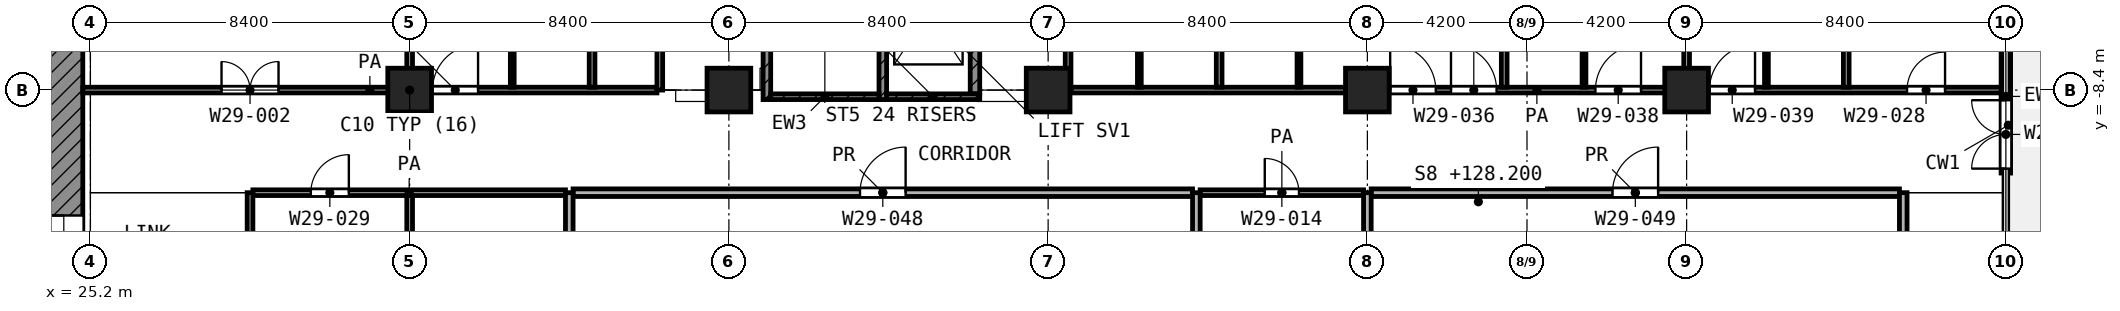
"""IFC4 building model, lengths in metres.
Left out: names, types, materials, properties, quantities, classifications, styles, units other than length and angle.
Written with IfcOpenShell. Run it as: python <this file> out.ifc"""

import sys

from ifc_helpers import new_model, si_unit, direction, frame, frame_2d, origin, origin_2d, place, context, subcontext, project, spatial, rectangle, extrude, element, fill, save


model = new_model("IFC4")
c1 = context("Model", 3, precision=1e-05, world=origin(), true_north=direction((0.0, 1.0)))
c2 = subcontext(c1, "Body", "Model", "MODEL_VIEW")
j1 = project(units=[si_unit("LENGTHUNIT", "METRE"), si_unit("PLANEANGLEUNIT", "RADIAN")], contexts=[c1])
p1 = place(None, origin())
s1 = spatial("IfcSite", under=j1, at=p1, CompositionType="ELEMENT")
p2 = place(p1, origin())
s2 = spatial("IfcBuilding", under=s1, at=p2, CompositionType="ELEMENT")
p3 = place(p2, frame((0.0, 0.0, 128.2)))
s3 = spatial("IfcBuildingStorey", under=s2, at=p3, CompositionType="ELEMENT", Elevation=128.2)
for number, where, z_axis, x_axis in (
    (1, (33.6, -8.4, 0.0), (0.0, 0.0, 1.0), (1.0, 0.0, 0.0)),
    (2, (42.0, -8.4, 0.0), (0.0, 0.0, 1.0), (1.0, 0.0, 0.0)),
    (3, (50.4, -8.4, 0.0), (0.0, 0.0, 1.0), (1.0, 0.0, 0.0)),
    (4, (58.8, -8.4, 0.0), (0.0, 0.0, 1.0), (1.0, 0.0, 0.0)),
    (5, (67.2, -8.4, 0.0), (0.0, 0.0, 1.0), (1.0, 0.0, 0.0)),
):
    element("IfcColumn", number, at=place(p3, frame(where, z_axis=z_axis, x_axis=x_axis)), inside=s3, PredefinedType="COLUMN", context=c2, shape_type="SweptSolid", body=[
        extrude(rectangle(XDim=1.15, YDim=1.15, at=origin_2d()), origin(), (0.0, 0.0, 1.0), 4.2),
    ])
p4 = place(p3, frame((75.6, -10.583, 0.0), z_axis=(0.0, 0.0, 1.0), x_axis=(0.0, 1.0, 0.0)))
e6 = element("IfcWall", 6, at=p4, inside=s3, PredefinedType="SOLIDWALL", context=c2, shape_type="SweptSolid", body=[
    extrude(rectangle(XDim=4.033, YDim=0.25, at=frame_2d((2.017, 0.0))), origin(), (0.0, 0.0, 1.0), 3.48),
])
p5 = place(p4, frame((0.117, 0.0, 0.0)))
e7 = element("IfcOpeningElement", 7, at=p5, cuts=e6, PredefinedType="OPENING", context=c2, shape_type="SweptSolid", body=[
    extrude(rectangle(XDim=1.8, YDim=2.1, at=frame_2d((0.9, 1.05))), frame((0.0, 0.135, 0.0), z_axis=(0.0, -1.0, 0.0), x_axis=(1.0, 0.0, 0.0)), (0.0, 0.0, 1.0), 0.27),
])
p6 = place(p3, frame((24.5, -24.0, 0.0), z_axis=(0.0, 0.0, 1.0), x_axis=(0.0, 1.0, 0.0)))
e8 = element("IfcWall", 8, at=p6, inside=s3, PredefinedType="SHEAR", context=c2, shape_type="SweptSolid", body=[
    extrude(rectangle(XDim=18.6, YDim=1.0, at=frame_2d((9.3, 0.0))), origin(), (0.0, 0.0, 1.0), 3.6),
])
p7 = place(p6, frame((10.5, 0.0, 0.0)))
e9 = element("IfcOpeningElement", 9, at=p7, cuts=e8, PredefinedType="OPENING", context=c2, shape_type="SweptSolid", body=[
    extrude(rectangle(XDim=1.8, YDim=2.1, at=frame_2d((0.9, 1.05))), frame((0.0, 0.51, 0.0), z_axis=(0.0, -1.0, 0.0), x_axis=(1.0, 0.0, 0.0)), (0.0, 0.0, 1.0), 1.02),
])
p8 = place(p3, frame((43.0, -8.65, 0.0), z_axis=(0.0, 0.0, 1.0), x_axis=(0.0, 1.0, 0.0)))
e10 = element("IfcWall", 10, at=p8, inside=s3, PredefinedType="SHEAR", context=c2, shape_type="SweptSolid", body=[
    extrude(rectangle(XDim=8.35, YDim=0.2, at=frame_2d((4.175, 0.0))), origin(), (0.0, 0.0, 1.0), 3.6),
])
p9 = place(p8, frame((7.0, 0.0, 0.0)))
e11 = element("IfcOpeningElement", 11, at=p9, cuts=e10, PredefinedType="OPENING", context=c2, shape_type="SweptSolid", body=[
    extrude(rectangle(XDim=1.1, YDim=2.1, at=frame_2d((0.55, 1.05))), frame((0.0, 0.11, 0.0), z_axis=(0.0, -1.0, 0.0), x_axis=(1.0, 0.0, 0.0)), (0.0, 0.0, 1.0), 0.22),
])
p10 = place(p3, frame((46.05, -8.65, 0.0), z_axis=(0.0, 0.0, 1.0), x_axis=(0.0, 1.0, 0.0)))
e12 = element("IfcWall", 12, at=p10, inside=s3, PredefinedType="SHEAR", context=c2, shape_type="SweptSolid", body=[
    extrude(rectangle(XDim=8.35, YDim=0.2, at=frame_2d((4.175, 0.0))), origin(), (0.0, 0.0, 1.0), 3.6),
])
p11 = place(p10, frame((7.0, 0.0, 0.0)))
e13 = element("IfcOpeningElement", 13, at=p11, cuts=e12, PredefinedType="OPENING", context=c2, shape_type="SweptSolid", body=[
    extrude(rectangle(XDim=1.1, YDim=2.1, at=frame_2d((0.55, 1.05))), frame((0.0, 0.11, 0.0), z_axis=(0.0, -1.0, 0.0), x_axis=(1.0, 0.0, 0.0)), (0.0, 0.0, 1.0), 0.22),
])
p12 = place(p3, frame((43.1, -8.575, 0.0), z_axis=(0.0, 0.0, 1.0), x_axis=(1.0, 0.0, 0.0)))
e14 = element("IfcWall", 14, at=p12, inside=s3, PredefinedType="SHEAR", context=c2, shape_type="SweptSolid", body=[
    extrude(rectangle(XDim=2.85, YDim=0.15, at=frame_2d((1.425, 0.0))), origin(), (0.0, 0.0, 1.0), 3.6),
])
p13 = place(p3, frame((46.15, -8.575, 0.0), z_axis=(0.0, 0.0, 1.0), x_axis=(1.0, 0.0, 0.0)))
e15 = element("IfcWall", 15, at=p13, inside=s3, PredefinedType="SHEAR", context=c2, shape_type="SweptSolid", body=[
    extrude(rectangle(XDim=2.45, YDim=0.15, at=frame_2d((1.225, 0.0))), origin(), (0.0, 0.0, 1.0), 3.6),
])
p14 = place(p3, frame((48.475, -8.5, 0.0), z_axis=(0.0, 0.0, 1.0), x_axis=(0.0, 1.0, 0.0)))
e16 = element("IfcWall", 16, at=p14, inside=s3, PredefinedType="SHEAR", context=c2, shape_type="SweptSolid", body=[
    extrude(rectangle(XDim=3.475, YDim=0.25, at=frame_2d((1.738, 0.0))), origin(), (0.0, 0.0, 1.0), 3.6),
])
p15 = place(p3, frame((36.3, -8.325, 0.0), z_axis=(0.0, 0.0, 1.0), x_axis=(0.0, 1.0, 0.0)))
e17 = element("IfcWall", 17, at=p15, inside=s3, PredefinedType="PARTITIONING", context=c2, shape_type="SweptSolid", body=[
    extrude(rectangle(XDim=2.624, YDim=0.1, at=frame_2d((1.312, 0.0))), origin(), (0.0, 0.0, 1.0), 3.6),
])
p16 = place(p3, frame((52.8, -8.325, 0.0), z_axis=(0.0, 0.0, 1.0), x_axis=(0.0, 1.0, 0.0)))
e18 = element("IfcWall", 18, at=p16, inside=s3, PredefinedType="PARTITIONING", context=c2, shape_type="SweptSolid", body=[
    extrude(rectangle(XDim=2.625, YDim=0.1, at=frame_2d((1.312, 0.0))), origin(), (0.0, 0.0, 1.0), 3.6),
])
p17 = place(p3, frame((57.0, -8.325, 0.0), z_axis=(0.0, 0.0, 1.0), x_axis=(0.0, 1.0, 0.0)))
e19 = element("IfcWall", 19, at=p17, inside=s3, PredefinedType="PARTITIONING", context=c2, shape_type="SweptSolid", body=[
    extrude(rectangle(XDim=2.624, YDim=0.1, at=frame_2d((1.312, 0.0))), origin(), (0.0, 0.0, 1.0), 3.6),
])
p18 = place(p3, frame((64.5, -8.325, 0.0), z_axis=(0.0, 0.0, 1.0), x_axis=(0.0, 1.0, 0.0)))
e20 = element("IfcWall", 20, at=p18, inside=s3, PredefinedType="PARTITIONING", context=c2, shape_type="SweptSolid", body=[
    extrude(rectangle(XDim=2.625, YDim=0.1, at=frame_2d((1.312, 0.0))), origin(), (0.0, 0.0, 1.0), 3.6),
])
p19 = place(p3, frame((69.3, -8.325, 0.0), z_axis=(0.0, 0.0, 1.0), x_axis=(0.0, 1.0, 0.0)))
e21 = element("IfcWall", 21, at=p19, inside=s3, PredefinedType="PARTITIONING", context=c2, shape_type="SweptSolid", body=[
    extrude(rectangle(XDim=2.624, YDim=0.1, at=frame_2d((1.312, 0.0))), origin(), (0.0, 0.0, 1.0), 3.6),
])
p20 = place(p3, frame((29.475, -11.1, 0.0), z_axis=(0.0, 0.0, 1.0), x_axis=(1.0, 0.0, 0.0)))
e22 = element("IfcWall", 22, at=p20, inside=s3, PredefinedType="PARTITIONING", context=c2, shape_type="SweptSolid", body=[
    extrude(rectangle(XDim=8.225, YDim=0.15, at=frame_2d((4.112, 0.0))), origin(), (0.0, 0.0, 1.0), 3.6),
])
p21 = place(p20, frame((1.525, 0.0, 0.0)))
e23 = element("IfcOpeningElement", 23, at=p21, cuts=e22, PredefinedType="OPENING", context=c2, shape_type="SweptSolid", body=[
    extrude(rectangle(XDim=1.0, YDim=2.1, at=frame_2d((0.5, 1.05))), frame((0.0, 0.085, 0.0), z_axis=(0.0, -1.0, 0.0), x_axis=(1.0, 0.0, 0.0)), (0.0, 0.0, 1.0), 0.17),
])
p22 = place(p3, frame((54.4, -11.1, 0.0), z_axis=(0.0, 0.0, 1.0), x_axis=(1.0, 0.0, 0.0)))
e24 = element("IfcWall", 24, at=p22, inside=s3, PredefinedType="PARTITIONING", context=c2, shape_type="SweptSolid", body=[
    extrude(rectangle(XDim=4.3, YDim=0.15, at=frame_2d((2.15, 0.0))), origin(), (0.0, 0.0, 1.0), 3.6),
])
p23 = place(p22, frame((1.7, 0.0, 0.0)))
e25 = element("IfcOpeningElement", 25, at=p23, cuts=e24, PredefinedType="OPENING", context=c2, shape_type="SweptSolid", body=[
    extrude(rectangle(XDim=0.9, YDim=2.1, at=frame_2d((0.45, 1.05))), frame((0.0, 0.085, 0.0), z_axis=(0.0, -1.0, 0.0), x_axis=(1.0, 0.0, 0.0)), (0.0, 0.0, 1.0), 0.17),
])
p24 = place(p3, frame((25.0, -8.4, 0.0), z_axis=(0.0, 0.0, 1.0), x_axis=(1.0, 0.0, 0.0)))
e26 = element("IfcWall", 26, at=p24, inside=s3, PredefinedType="PARTITIONING", context=c2, shape_type="SweptSolid", body=[
    extrude(rectangle(XDim=15.107, YDim=0.15, at=frame_2d((7.553, 0.0))), origin(), (0.0, 0.0, 1.0), 3.6),
])
p25 = place(p24, frame((3.65, 0.0, 0.0)))
e27 = element("IfcOpeningElement", 27, at=p25, cuts=e26, PredefinedType="OPENING", context=c2, shape_type="SweptSolid", body=[
    extrude(rectangle(XDim=1.5, YDim=2.1, at=frame_2d((0.75, 1.05))), frame((0.0, 0.085, 0.0), z_axis=(0.0, -1.0, 0.0), x_axis=(1.0, 0.0, 0.0)), (0.0, 0.0, 1.0), 0.17),
])
p26 = place(p24, frame((9.2, 0.0, 0.0)))
e28 = element("IfcOpeningElement", 28, at=p26, cuts=e26, PredefinedType="OPENING", context=c2, shape_type="SweptSolid", body=[
    extrude(rectangle(XDim=1.2, YDim=2.1, at=frame_2d((0.6, 1.05))), frame((0.0, 0.085, 0.0), z_axis=(0.0, -1.0, 0.0), x_axis=(1.0, 0.0, 0.0)), (0.0, 0.0, 1.0), 0.17),
])
p27 = place(p3, frame((51.0, -8.4, 0.0), z_axis=(0.0, 0.0, 1.0), x_axis=(1.0, 0.0, 0.0)))
e29 = element("IfcWall", 29, at=p27, inside=s3, PredefinedType="PARTITIONING", context=c2, shape_type="SweptSolid", body=[
    extrude(rectangle(XDim=24.52, YDim=0.15, at=frame_2d((12.26, 0.0))), origin(), (0.0, 0.0, 1.0), 3.6),
])
p28 = place(p27, frame((8.4, 0.0, 0.0)))
e30 = element("IfcOpeningElement", 30, at=p28, cuts=e29, PredefinedType="OPENING", context=c2, shape_type="SweptSolid", body=[
    extrude(rectangle(XDim=1.2, YDim=2.1, at=frame_2d((0.6, 1.05))), frame((0.0, 0.085, 0.0), z_axis=(0.0, -1.0, 0.0), x_axis=(1.0, 0.0, 0.0)), (0.0, 0.0, 1.0), 0.17),
])
p29 = place(p27, frame((10.0, 0.0, 0.0)))
e31 = element("IfcOpeningElement", 31, at=p29, cuts=e29, PredefinedType="OPENING", context=c2, shape_type="SweptSolid", body=[
    extrude(rectangle(XDim=1.2, YDim=2.1, at=frame_2d((0.6, 1.05))), frame((0.0, 0.085, 0.0), z_axis=(0.0, -1.0, 0.0), x_axis=(1.0, 0.0, 0.0)), (0.0, 0.0, 1.0), 0.17),
])
p30 = place(p27, frame((13.8, 0.0, 0.0)))
e32 = element("IfcOpeningElement", 32, at=p30, cuts=e29, PredefinedType="OPENING", context=c2, shape_type="SweptSolid", body=[
    extrude(rectangle(XDim=1.2, YDim=2.1, at=frame_2d((0.6, 1.05))), frame((0.0, 0.085, 0.0), z_axis=(0.0, -1.0, 0.0), x_axis=(1.0, 0.0, 0.0)), (0.0, 0.0, 1.0), 0.17),
])
p31 = place(p27, frame((16.8, 0.0, 0.0)))
e33 = element("IfcOpeningElement", 33, at=p31, cuts=e29, PredefinedType="OPENING", context=c2, shape_type="SweptSolid", body=[
    extrude(rectangle(XDim=1.2, YDim=2.1, at=frame_2d((0.6, 1.05))), frame((0.0, 0.085, 0.0), z_axis=(0.0, -1.0, 0.0), x_axis=(1.0, 0.0, 0.0)), (0.0, 0.0, 1.0), 0.17),
])
p32 = place(p27, frame((22.0, 0.0, 0.0)))
e34 = element("IfcOpeningElement", 34, at=p32, cuts=e29, PredefinedType="OPENING", context=c2, shape_type="SweptSolid", body=[
    extrude(rectangle(XDim=1.0, YDim=2.1, at=frame_2d((0.5, 1.05))), frame((0.0, 0.085, 0.0), z_axis=(0.0, -1.0, 0.0), x_axis=(1.0, 0.0, 0.0)), (0.0, 0.0, 1.0), 0.17),
])
p33 = place(p3, frame((29.4, -14.1, 0.0), z_axis=(0.0, 0.0, 1.0), x_axis=(0.0, 1.0, 0.0)))
e35 = element("IfcWall", 35, at=p33, inside=s3, PredefinedType="PARTITIONING", context=c2, shape_type="SweptSolid", body=[
    extrude(rectangle(XDim=3.0, YDim=0.15, at=frame_2d((1.5, 0.0))), origin(), (0.0, 0.0, 1.0), 3.6),
])
p34 = place(p3, frame((33.6, -14.025, 0.0), z_axis=(0.0, 0.0, 1.0), x_axis=(0.0, 1.0, 0.0)))
e36 = element("IfcWall", 36, at=p34, inside=s3, PredefinedType="PARTITIONING", context=c2, shape_type="SweptSolid", body=[
    extrude(rectangle(XDim=2.85, YDim=0.15, at=frame_2d((1.425, 0.0))), origin(), (0.0, 0.0, 1.0), 3.6),
])
for number, where, z_axis, x_axis in (
    (37, (33.6, -8.325, 0.0), (0.0, 0.0, 1.0), (0.0, 1.0, 0.0)),
    (38, (38.4, -8.325, 0.0), (0.0, 0.0, 1.0), (0.0, 1.0, 0.0)),
):
    element("IfcWall", number, at=place(p3, frame(where, z_axis=z_axis, x_axis=x_axis)), inside=s3, PredefinedType="PARTITIONING", context=c2, shape_type="SweptSolid", body=[
        extrude(rectangle(XDim=8.322, YDim=0.15, at=frame_2d((4.161, 0.0))), origin(), (0.0, 0.0, 1.0), 3.6),
    ])
p35 = place(p3, frame((40.182, -8.4, 0.0), z_axis=(0.0, 0.0, 1.0), x_axis=(0.0, 1.0, 0.0)))
e39 = element("IfcWall", 39, at=p35, inside=s3, PredefinedType="PARTITIONING", context=c2, shape_type="SweptSolid", body=[
    extrude(rectangle(XDim=8.05, YDim=0.15, at=frame_2d((4.025, 0.0))), origin(), (0.0, 0.0, 1.0), 3.6),
])
p36 = place(p35, frame((3.525, 0.0, 0.0)))
e40 = element("IfcOpeningElement", 40, at=p36, cuts=e39, PredefinedType="OPENING", context=c2, shape_type="SweptSolid", body=[
    extrude(rectangle(XDim=1.0, YDim=2.1, at=frame_2d((0.5, 1.05))), frame((0.0, 0.085, 0.0), z_axis=(0.0, -1.0, 0.0), x_axis=(1.0, 0.0, 0.0)), (0.0, 0.0, 1.0), 0.17),
])
p37 = place(p3, frame((50.925, -8.4, 0.0), z_axis=(0.0, 0.0, 1.0), x_axis=(0.0, 1.0, 0.0)))
e41 = element("IfcWall", 41, at=p37, inside=s3, PredefinedType="PARTITIONING", context=c2, shape_type="SweptSolid", body=[
    extrude(rectangle(XDim=6.547, YDim=0.15, at=frame_2d((3.273, 0.0))), origin(), (0.0, 0.0, 1.0), 3.6),
])
p38 = place(p37, frame((3.765, 0.0, 0.0)))
e42 = element("IfcOpeningElement", 42, at=p38, cuts=e41, PredefinedType="OPENING", context=c2, shape_type="SweptSolid", body=[
    extrude(rectangle(XDim=1.2, YDim=2.1, at=frame_2d((0.6, 1.05))), frame((0.0, 0.085, 0.0), z_axis=(0.0, -1.0, 0.0), x_axis=(1.0, 0.0, 0.0)), (0.0, 0.0, 1.0), 0.17),
])
p39 = place(p37, frame((1.582, 0.0, 0.0)))
e43 = element("IfcOpeningElement", 43, at=p39, cuts=e41, PredefinedType="OPENING", context=c2, shape_type="SweptSolid", body=[
    extrude(rectangle(XDim=1.2, YDim=2.1, at=frame_2d((0.6, 1.05))), frame((0.0, 0.085, 0.0), z_axis=(0.0, -1.0, 0.0), x_axis=(1.0, 0.0, 0.0)), (0.0, 0.0, 1.0), 0.17),
])
p40 = place(p3, frame((54.9, -8.325, 0.0), z_axis=(0.0, 0.0, 1.0), x_axis=(0.0, 1.0, 0.0)))
e44 = element("IfcWall", 44, at=p40, inside=s3, PredefinedType="PARTITIONING", context=c2, shape_type="SweptSolid", body=[
    extrude(rectangle(XDim=8.323, YDim=0.15, at=frame_2d((4.162, 0.0))), origin(), (0.0, 0.0, 1.0), 3.6),
])
p41 = place(p3, frame((62.4, -8.325, 0.0), z_axis=(0.0, 0.0, 1.0), x_axis=(0.0, 1.0, 0.0)))
e45 = element("IfcWall", 45, at=p41, inside=s3, PredefinedType="PARTITIONING", context=c2, shape_type="SweptSolid", body=[
    extrude(rectangle(XDim=8.325, YDim=0.15, at=frame_2d((4.163, 0.0))), origin(), (0.0, 0.0, 1.0), 3.6),
])
for number, where, z_axis, x_axis in (
    (46, (67.2, -8.325, 0.0), (0.0, 0.0, 1.0), (0.0, 1.0, 0.0)),
    (47, (71.4, -8.325, 0.0), (0.0, 0.0, 1.0), (0.0, 1.0, 0.0)),
):
    element("IfcWall", number, at=place(p3, frame(where, z_axis=z_axis, x_axis=x_axis)), inside=s3, PredefinedType="PARTITIONING", context=c2, shape_type="SweptSolid", body=[
        extrude(rectangle(XDim=8.323, YDim=0.15, at=frame_2d((4.162, 0.0))), origin(), (0.0, 0.0, 1.0), 3.6),
    ])
p42 = place(p3, frame((37.9, -11.1, 0.0), z_axis=(0.0, 0.0, 1.0), x_axis=(1.0, 0.0, 0.0)))
e48 = element("IfcWall", 48, at=p42, inside=s3, PredefinedType="PARTITIONING", context=c2, shape_type="SweptSolid", body=[
    extrude(rectangle(XDim=16.3, YDim=0.2, at=frame_2d((8.15, 0.0))), origin(), (0.0, 0.0, 1.0), 3.6),
])
p43 = place(p42, frame((7.55, 0.0, 0.0)))
e49 = element("IfcOpeningElement", 49, at=p43, cuts=e48, PredefinedType="OPENING", context=c2, shape_type="SweptSolid", body=[
    extrude(rectangle(XDim=1.2, YDim=2.1, at=frame_2d((0.6, 1.05))), frame((0.0, 0.11, 0.0), z_axis=(0.0, -1.0, 0.0), x_axis=(1.0, 0.0, 0.0)), (0.0, 0.0, 1.0), 0.22),
])
p44 = place(p3, frame((58.9, -11.1, 0.0), z_axis=(0.0, 0.0, 1.0), x_axis=(1.0, 0.0, 0.0)))
e50 = element("IfcWall", 50, at=p44, inside=s3, PredefinedType="PARTITIONING", context=c2, shape_type="SweptSolid", body=[
    extrude(rectangle(XDim=13.9, YDim=0.2, at=frame_2d((6.95, 0.0))), origin(), (0.0, 0.0, 1.0), 3.6),
])
p45 = place(p44, frame((6.35, 0.0, 0.0)))
e51 = element("IfcOpeningElement", 51, at=p45, cuts=e50, PredefinedType="OPENING", context=c2, shape_type="SweptSolid", body=[
    extrude(rectangle(XDim=1.2, YDim=2.1, at=frame_2d((0.6, 1.05))), frame((0.0, 0.11, 0.0), z_axis=(0.0, -1.0, 0.0), x_axis=(1.0, 0.0, 0.0)), (0.0, 0.0, 1.0), 0.22),
])
for number, where, z_axis, x_axis in (
    (52, (37.8, -14.1, 0.0), (0.0, 0.0, 1.0), (0.0, 1.0, 0.0)),
    (53, (54.3, -14.1, 0.0), (0.0, 0.0, 1.0), (0.0, 1.0, 0.0)),
    (54, (58.8, -14.1, 0.0), (0.0, 0.0, 1.0), (0.0, 1.0, 0.0)),
    (55, (72.9, -14.1, 0.0), (0.0, 0.0, 1.0), (0.0, 1.0, 0.0)),
):
    element("IfcWall", number, at=place(p3, frame(where, z_axis=z_axis, x_axis=x_axis)), inside=s3, PredefinedType="PARTITIONING", context=c2, shape_type="SweptSolid", body=[
        extrude(rectangle(XDim=3.0, YDim=0.2, at=frame_2d((1.5, 0.0))), origin(), (0.0, 0.0, 1.0), 3.6),
    ])
p46 = place(p5, origin())
e56 = element("IfcDoor", 56, at=p46, inside=s3, OperationType="DOUBLE_DOOR_SINGLE_SWING", PredefinedType="DOOR", context=c2, shape_type="SweptSolid", body=[
    extrude(rectangle(XDim=1.8, YDim=2.1, at=frame_2d((0.9, 1.05))), frame((0.0, 0.025, 0.0), z_axis=(0.0, -1.0, 0.0), x_axis=(1.0, 0.0, 0.0)), (0.0, 0.0, 1.0), 0.05),
])
fill(e7, e56)
p47 = place(p7, origin())
e57 = element("IfcDoor", 57, at=p47, inside=s3, OperationType="DOUBLE_DOOR_SINGLE_SWING", PredefinedType="DOOR", context=c2, shape_type="SweptSolid", body=[
    extrude(rectangle(XDim=1.8, YDim=2.1, at=frame_2d((0.9, 1.05))), frame((0.0, 0.025, 0.0), z_axis=(0.0, -1.0, 0.0), x_axis=(1.0, 0.0, 0.0)), (0.0, 0.0, 1.0), 0.05),
])
fill(e9, e57)
p48 = place(p25, origin())
e58 = element("IfcDoor", 58, at=p48, inside=s3, OperationType="DOUBLE_DOOR_SINGLE_SWING", PredefinedType="DOOR", context=c2, shape_type="SweptSolid", body=[
    extrude(rectangle(XDim=1.5, YDim=2.1, at=frame_2d((0.75, 1.05))), frame((0.0, 0.025, 0.0), z_axis=(0.0, -1.0, 0.0), x_axis=(1.0, 0.0, 0.0)), (0.0, 0.0, 1.0), 0.05),
])
fill(e27, e58)
p49 = place(p26, origin())
e59 = element("IfcDoor", 59, at=p49, inside=s3, OperationType="SINGLE_SWING_RIGHT", PredefinedType="DOOR", context=c2, shape_type="SweptSolid", body=[
    extrude(rectangle(XDim=1.2, YDim=2.1, at=frame_2d((0.6, 1.05))), frame((0.0, 0.025, 0.0), z_axis=(0.0, -1.0, 0.0), x_axis=(1.0, 0.0, 0.0)), (0.0, 0.0, 1.0), 0.05),
])
fill(e28, e59)
p50 = place(p28, origin())
e60 = element("IfcDoor", 60, at=p50, inside=s3, OperationType="SINGLE_SWING_LEFT", PredefinedType="DOOR", context=c2, shape_type="SweptSolid", body=[
    extrude(rectangle(XDim=1.2, YDim=2.1, at=frame_2d((0.6, 1.05))), frame((0.0, 0.025, 0.0), z_axis=(0.0, -1.0, 0.0), x_axis=(1.0, 0.0, 0.0)), (0.0, 0.0, 1.0), 0.05),
])
fill(e30, e60)
p51 = place(p29, origin())
e61 = element("IfcDoor", 61, at=p51, inside=s3, OperationType="SINGLE_SWING_LEFT", PredefinedType="DOOR", context=c2, shape_type="SweptSolid", body=[
    extrude(rectangle(XDim=1.2, YDim=2.1, at=frame_2d((0.6, 1.05))), frame((0.0, 0.025, 0.0), z_axis=(0.0, -1.0, 0.0), x_axis=(1.0, 0.0, 0.0)), (0.0, 0.0, 1.0), 0.05),
])
fill(e31, e61)
p52 = place(p30, origin())
e62 = element("IfcDoor", 62, at=p52, inside=s3, OperationType="SINGLE_SWING_RIGHT", PredefinedType="DOOR", context=c2, shape_type="SweptSolid", body=[
    extrude(rectangle(XDim=1.2, YDim=2.1, at=frame_2d((0.6, 1.05))), frame((0.0, 0.025, 0.0), z_axis=(0.0, -1.0, 0.0), x_axis=(1.0, 0.0, 0.0)), (0.0, 0.0, 1.0), 0.05),
])
fill(e32, e62)
p53 = place(p31, origin())
e63 = element("IfcDoor", 63, at=p53, inside=s3, OperationType="SINGLE_SWING_RIGHT", PredefinedType="DOOR", context=c2, shape_type="SweptSolid", body=[
    extrude(rectangle(XDim=1.2, YDim=2.1, at=frame_2d((0.6, 1.05))), frame((0.0, 0.025, 0.0), z_axis=(0.0, -1.0, 0.0), x_axis=(1.0, 0.0, 0.0)), (0.0, 0.0, 1.0), 0.05),
])
fill(e33, e63)
p54 = place(p32, origin())
e64 = element("IfcDoor", 64, at=p54, inside=s3, OperationType="SINGLE_SWING_RIGHT", PredefinedType="DOOR", context=c2, shape_type="SweptSolid", body=[
    extrude(rectangle(XDim=1.0, YDim=2.1, at=frame_2d((0.5, 1.05))), frame((0.0, 0.025, 0.0), z_axis=(0.0, -1.0, 0.0), x_axis=(1.0, 0.0, 0.0)), (0.0, 0.0, 1.0), 0.05),
])
fill(e34, e64)
p55 = place(p21, origin())
e65 = element("IfcDoor", 65, at=p55, inside=s3, OperationType="SINGLE_SWING_RIGHT", PredefinedType="DOOR", context=c2, shape_type="SweptSolid", body=[
    extrude(rectangle(XDim=1.0, YDim=2.1, at=frame_2d((0.5, 1.05))), frame((0.0, 0.025, 0.0), z_axis=(0.0, -1.0, 0.0), x_axis=(1.0, 0.0, 0.0)), (0.0, 0.0, 1.0), 0.05),
])
fill(e23, e65)
p56 = place(p43, origin())
e66 = element("IfcDoor", 66, at=p56, inside=s3, OperationType="SINGLE_SWING_RIGHT", PredefinedType="DOOR", context=c2, shape_type="SweptSolid", body=[
    extrude(rectangle(XDim=1.2, YDim=2.1, at=frame_2d((0.6, 1.05))), frame((0.0, 0.025, 0.0), z_axis=(0.0, -1.0, 0.0), x_axis=(1.0, 0.0, 0.0)), (0.0, 0.0, 1.0), 0.05),
])
fill(e49, e66)
p57 = place(p23, origin())
e67 = element("IfcDoor", 67, at=p57, inside=s3, OperationType="SINGLE_SWING_LEFT", PredefinedType="DOOR", context=c2, shape_type="SweptSolid", body=[
    extrude(rectangle(XDim=0.9, YDim=2.1, at=frame_2d((0.45, 1.05))), frame((0.0, 0.025, 0.0), z_axis=(0.0, -1.0, 0.0), x_axis=(1.0, 0.0, 0.0)), (0.0, 0.0, 1.0), 0.05),
])
fill(e25, e67)
p58 = place(p45, origin())
e68 = element("IfcDoor", 68, at=p58, inside=s3, OperationType="SINGLE_SWING_RIGHT", PredefinedType="DOOR", context=c2, shape_type="SweptSolid", body=[
    extrude(rectangle(XDim=1.2, YDim=2.1, at=frame_2d((0.6, 1.05))), frame((0.0, 0.025, 0.0), z_axis=(0.0, -1.0, 0.0), x_axis=(1.0, 0.0, 0.0)), (0.0, 0.0, 1.0), 0.05),
])
fill(e51, e68)
save(model, sys.argv[1])
